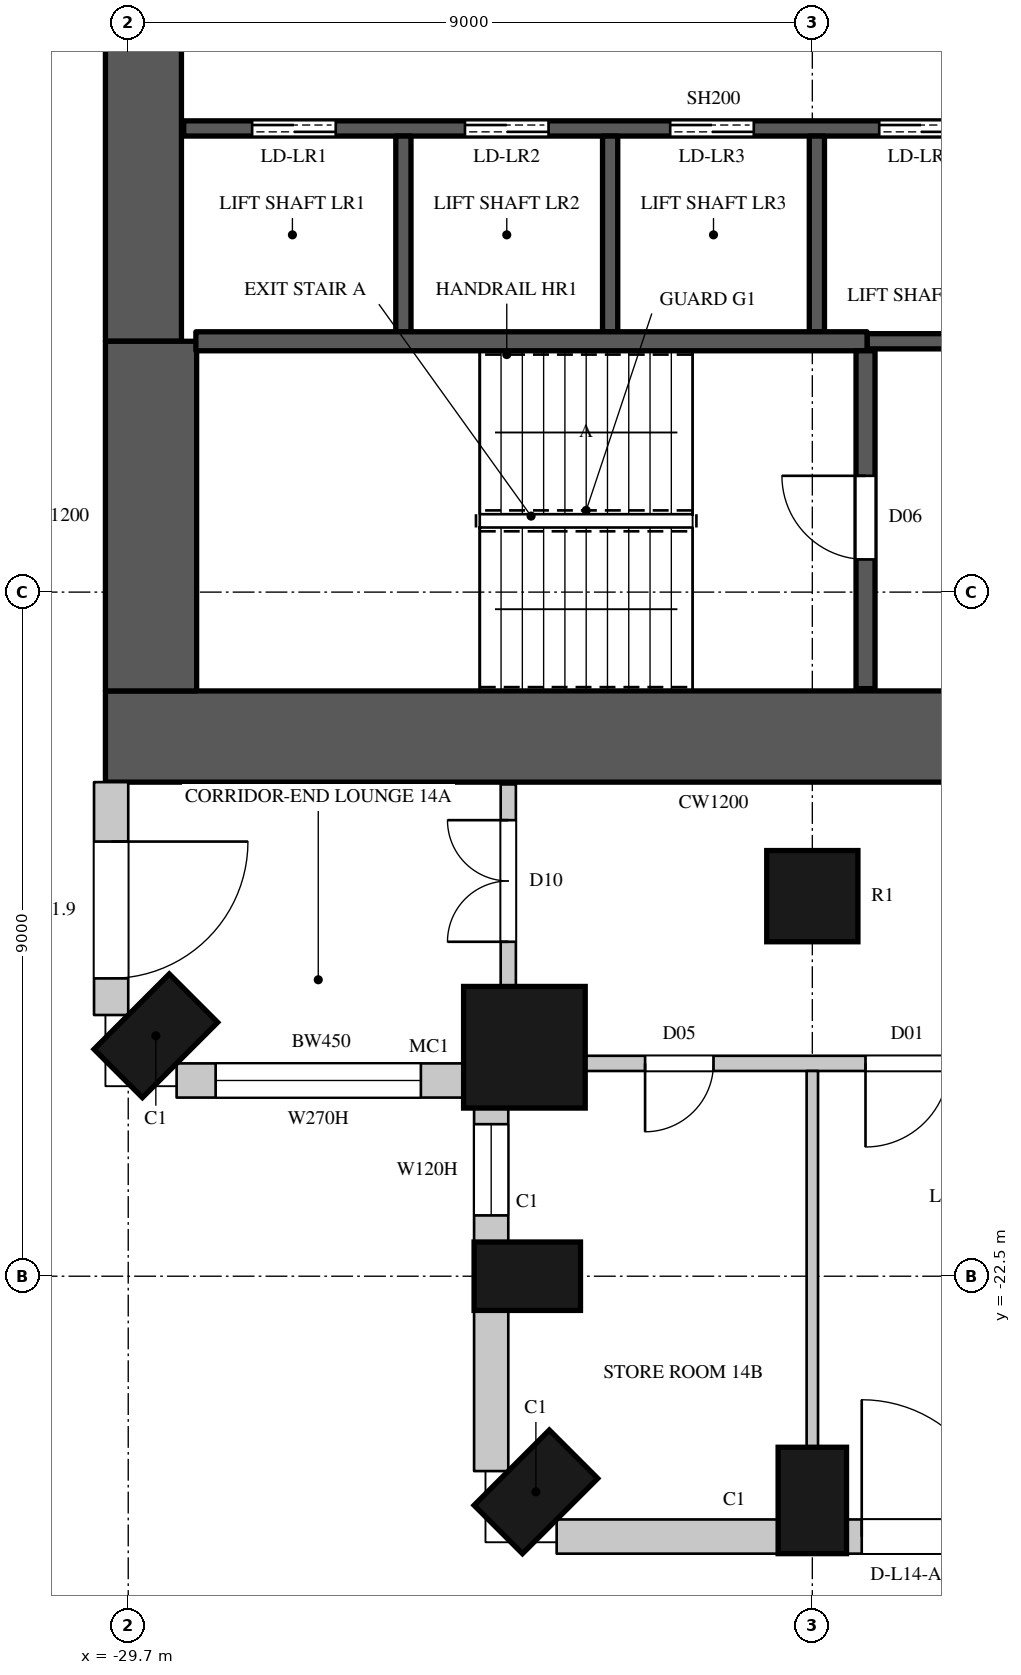
"""IFC4 building model, lengths in metres.
Left out: names, types, materials, properties, quantities, classifications, styles, units other than length and angle.
Written with IfcOpenShell. Run it as: python <this file> out.ifc"""

import sys

from ifc_helpers import new_model, si_unit, direction, frame, frame_2d, origin, origin_2d, place, context, subcontext, project, spatial, rectangle, circle, extrude, element, fill, save


model = new_model("IFC4")
c1 = context("Model", 3, precision=1e-05, world=origin(), true_north=direction((0.0, 1.0)))
c2 = subcontext(c1, "Body", "Model", "MODEL_VIEW")
j1 = project(units=[si_unit("LENGTHUNIT", "METRE"), si_unit("PLANEANGLEUNIT", "RADIAN")], contexts=[c1])
p1 = place(None, origin())
s1 = spatial("IfcSite", under=j1, at=p1, CompositionType="ELEMENT")
p2 = place(p1, origin())
s2 = spatial("IfcBuilding", under=s1, at=p2, CompositionType="ELEMENT")
p3 = place(p2, frame((0.0, 0.0, 80.7)))
s3 = spatial("IfcBuildingStorey", under=s2, at=p3, CompositionType="ELEMENT", Elevation=80.7)
p4 = place(p3, frame((-29.337, -19.337, 0.0), z_axis=(0.0, 0.0, 1.0), x_axis=(0.707106781187, -0.707106781187, 0.0)))
e1 = element("IfcColumn", 1, at=p4, inside=s3, PredefinedType="COLUMN", context=c2, shape_type="SweptSolid", body=[
    extrude(rectangle(XDim=0.9, YDim=1.4, at=origin_2d()), origin(), (0.0, 0.0, 1.0), 3.6),
])
p5 = place(p3, frame((-24.488, -19.488, 0.0), z_axis=(0.0, 0.0, 1.0), x_axis=(1.0, 0.0, 0.0)))
e2 = element("IfcColumn", 2, at=p5, inside=s3, PredefinedType="COLUMN", context=c2, shape_type="SweptSolid", body=[
    extrude(circle(Radius=0.8, at=origin_2d()), origin(), (0.0, 0.0, 1.0), 3.6),
])
for number, where, z_axis, x_axis in (
    (3, (-24.45, -22.5, 0.0), (0.0, 0.0, 1.0), (0.0, -1.0, 0.0)),
    (4, (-24.337, -25.337, 0.0), (0.0, 0.0, 1.0), (0.707, -0.707, 0.0)),
    (5, (-20.7, -25.45, 0.0), (0.0, 0.0, 1.0), (1.0, 0.0, 0.0)),
):
    element("IfcColumn", number, at=place(p3, frame(where, z_axis=z_axis, x_axis=x_axis)), inside=s3, PredefinedType="COLUMN", context=c2, shape_type="SweptSolid", body=[
        extrude(rectangle(XDim=0.9, YDim=1.4, at=origin_2d()), origin(), (0.0, 0.0, 1.0), 3.6),
    ])
p6 = place(p3, frame((-20.7, -17.5, 0.0), z_axis=(0.0, 0.0, 1.0), x_axis=(1.0, 0.0, 0.0)))
e6 = element("IfcColumn", 6, at=p6, inside=s3, PredefinedType="COLUMN", context=c2, shape_type="SweptSolid", body=[
    extrude(circle(Radius=0.6, at=origin_2d()), origin(), (0.0, 0.0, 1.0), 3.6),
])
p7 = place(p3, frame((-29.925, -16.0, 0.0), z_axis=(0.0, 0.0, 1.0), x_axis=(0.0, -1.0, 0.0)))
e7 = element("IfcWall", 7, at=p7, inside=s3, PredefinedType="SOLIDWALL", context=c2, shape_type="SweptSolid", body=[
    extrude(rectangle(XDim=3.064, YDim=0.45, at=frame_2d((1.532, 0.0))), origin(), (0.0, 0.0, 1.0), 3.3),
])
p8 = place(p7, frame((0.782, 0.0, 0.0)))
e8 = element("IfcOpeningElement", 8, at=p8, cuts=e7, PredefinedType="OPENING", context=c2, shape_type="SweptSolid", body=[
    extrude(rectangle(XDim=1.8, YDim=2.4, at=frame_2d((0.9, 1.2))), frame((0.0, 0.235, 0.0), z_axis=(0.0, -1.0, 0.0), x_axis=(1.0, 0.0, 0.0)), (0.0, 0.0, 1.0), 0.47),
])
p9 = place(p3, frame((-29.064, -19.925, 0.0), z_axis=(0.0, 0.0, 1.0), x_axis=(1.0, 0.0, 0.0)))
e9 = element("IfcWall", 9, at=p9, inside=s3, PredefinedType="SOLIDWALL", context=c2, shape_type="SweptSolid", body=[
    extrude(rectangle(XDim=3.805, YDim=0.45, at=frame_2d((1.903, 0.0))), origin(), (0.0, 0.0, 1.0), 3.3),
])
p10 = place(p9, frame((0.514, 0.0, 1.05)))
e10 = element("IfcOpeningElement", 10, at=p10, cuts=e9, PredefinedType="OPENING", context=c2, shape_type="SweptSolid", body=[
    extrude(rectangle(XDim=2.7, YDim=2.0, at=frame_2d((1.35, 1.0))), frame((0.0, 0.235, 0.0), z_axis=(0.0, -1.0, 0.0), x_axis=(1.0, 0.0, 0.0)), (0.0, 0.0, 1.0), 0.47),
])
p11 = place(p3, frame((-24.925, -20.259, 0.0), z_axis=(0.0, 0.0, 1.0), x_axis=(0.0, -1.0, 0.0)))
e11 = element("IfcWall", 11, at=p11, inside=s3, PredefinedType="SOLIDWALL", context=c2, shape_type="SweptSolid", body=[
    extrude(rectangle(XDim=1.792, YDim=0.45, at=frame_2d((0.896, 0.0))), origin(), (0.0, 0.0, 1.0), 3.3),
])
p12 = place(p11, frame((0.241, 0.0, 1.05)))
e12 = element("IfcOpeningElement", 12, at=p12, cuts=e11, PredefinedType="OPENING", context=c2, shape_type="SweptSolid", body=[
    extrude(rectangle(XDim=1.2, YDim=2.0, at=frame_2d((0.6, 1.0))), frame((0.0, 0.235, 0.0), z_axis=(0.0, -1.0, 0.0), x_axis=(1.0, 0.0, 0.0)), (0.0, 0.0, 1.0), 0.47),
])
p13 = place(p3, frame((-24.925, -22.95, 0.0), z_axis=(0.0, 0.0, 1.0), x_axis=(0.0, -1.0, 0.0)))
e13 = element("IfcWall", 13, at=p13, inside=s3, PredefinedType="SOLIDWALL", context=c2, shape_type="SweptSolid", body=[
    extrude(rectangle(XDim=2.114, YDim=0.45, at=frame_2d((1.057, 0.0))), origin(), (0.0, 0.0, 1.0), 3.3),
])
p14 = place(p3, frame((-24.064, -25.925, 0.0), z_axis=(0.0, 0.0, 1.0), x_axis=(1.0, 0.0, 0.0)))
e14 = element("IfcWall", 14, at=p14, inside=s3, PredefinedType="SOLIDWALL", context=c2, shape_type="SweptSolid", body=[
    extrude(rectangle(XDim=2.914, YDim=0.45, at=frame_2d((1.457, 0.0))), origin(), (0.0, 0.0, 1.0), 3.3),
])
p15 = place(p3, frame((-20.25, -25.925, 0.0), z_axis=(0.0, 0.0, 1.0), x_axis=(1.0, 0.0, 0.0)))
e15 = element("IfcWall", 15, at=p15, inside=s3, PredefinedType="SOLIDWALL", context=c2, shape_type="SweptSolid", body=[
    extrude(rectangle(XDim=8.1, YDim=0.45, at=frame_2d((4.05, 0.0))), origin(), (0.0, 0.0, 1.0), 3.3),
])
p16 = place(p15, frame((0.2, 0.0, 0.0)))
e16 = element("IfcOpeningElement", 16, at=p16, cuts=e15, PredefinedType="OPENING", context=c2, shape_type="SweptSolid", body=[
    extrude(rectangle(XDim=1.8, YDim=2.4, at=frame_2d((0.9, 1.2))), frame((0.0, 0.235, 0.0), z_axis=(0.0, -1.0, 0.0), x_axis=(1.0, 0.0, 0.0)), (0.0, 0.0, 1.0), 0.47),
])
p17 = place(p15, frame((2.2, 0.0, 1.05)))
e17 = element("IfcOpeningElement", 17, at=p17, cuts=e15, PredefinedType="OPENING", context=c2, shape_type="SweptSolid", body=[
    extrude(rectangle(XDim=1.2, YDim=2.0, at=frame_2d((0.6, 1.0))), frame((0.0, 0.235, 0.0), z_axis=(0.0, -1.0, 0.0), x_axis=(1.0, 0.0, 0.0)), (0.0, 0.0, 1.0), 0.47),
])
p18 = place(p15, frame((4.7, 0.0, 0.0)))
e18 = element("IfcOpeningElement", 18, at=p18, cuts=e15, PredefinedType="OPENING", context=c2, shape_type="SweptSolid", body=[
    extrude(rectangle(XDim=1.8, YDim=2.4, at=frame_2d((0.9, 1.2))), frame((0.0, 0.235, 0.0), z_axis=(0.0, -1.0, 0.0), x_axis=(1.0, 0.0, 0.0)), (0.0, 0.0, 1.0), 0.47),
])
p19 = place(p15, frame((6.7, 0.0, 1.05)))
e19 = element("IfcOpeningElement", 19, at=p19, cuts=e15, PredefinedType="OPENING", context=c2, shape_type="SweptSolid", body=[
    extrude(rectangle(XDim=1.2, YDim=2.0, at=frame_2d((0.6, 1.0))), frame((0.0, 0.235, 0.0), z_axis=(0.0, -1.0, 0.0), x_axis=(1.0, 0.0, 0.0)), (0.0, 0.0, 1.0), 0.47),
])
p20 = place(p3, frame((-30.0, -15.4, 0.0), z_axis=(0.0, 0.0, 1.0), x_axis=(1.0, 0.0, 0.0)))
e20 = element("IfcWall", 20, at=p20, inside=s3, PredefinedType="SHEAR", context=c2, shape_type="SweptSolid", body=[
    extrude(rectangle(XDim=16.0, YDim=1.2, at=frame_2d((8.0, 0.0))), origin(), (0.0, 0.0, 1.0), 3.6),
])
p21 = place(p20, frame((13.4, 0.0, 0.0)))
e21 = element("IfcOpeningElement", 21, at=p21, cuts=e20, PredefinedType="OPENING", context=c2, shape_type="SweptSolid", body=[
    extrude(rectangle(XDim=1.5, YDim=2.4, at=frame_2d((0.75, 1.2))), frame((0.0, 0.61, 0.0), z_axis=(0.0, -1.0, 0.0), x_axis=(1.0, 0.0, 0.0)), (0.0, 0.0, 1.0), 1.22),
])
p22 = place(p3, frame((-29.5, -10.2, 0.0), z_axis=(0.0, 0.0, 1.0), x_axis=(0.0, 1.0, 0.0)))
e22 = element("IfcWall", 22, at=p22, inside=s3, PredefinedType="SHEAR", context=c2, shape_type="SweptSolid", body=[
    extrude(rectangle(XDim=20.4, YDim=1.0, at=frame_2d((10.2, 0.0))), origin(), (0.0, 0.0, 1.0), 3.6),
])
p23 = place(p3, frame((-29.4, -14.8, 0.0), z_axis=(0.0, 0.0, 1.0), x_axis=(0.0, 1.0, 0.0)))
e23 = element("IfcWall", 23, at=p23, inside=s3, PredefinedType="SHEAR", context=c2, shape_type="SweptSolid", body=[
    extrude(rectangle(XDim=4.6, YDim=1.2, at=frame_2d((2.3, 0.0))), origin(), (0.0, 0.0, 1.0), 3.6),
])
p24 = place(p3, frame((-24.7, -18.7, 0.0), z_axis=(0.0, 0.0, 1.0), x_axis=(0.0, 1.0, 0.0)))
e24 = element("IfcWall", 24, at=p24, inside=s3, PredefinedType="PARTITIONING", context=c2, shape_type="SweptSolid", body=[
    extrude(rectangle(XDim=2.67, YDim=0.2, at=frame_2d((1.335, 0.0))), origin(), (0.0, 0.0, 1.0), 3.3),
])
p25 = place(p24, frame((0.6, 0.0, 0.0)))
e25 = element("IfcOpeningElement", 25, at=p25, cuts=e24, PredefinedType="OPENING", context=c2, shape_type="SweptSolid", body=[
    extrude(rectangle(XDim=1.6, YDim=2.4, at=frame_2d((0.8, 1.2))), frame((0.0, 0.11, 0.0), z_axis=(0.0, -1.0, 0.0), x_axis=(1.0, 0.0, 0.0)), (0.0, 0.0, 1.0), 0.22),
])
p26 = place(p3, frame((-23.7, -19.7, 0.0), z_axis=(0.0, 0.0, 1.0), x_axis=(1.0, 0.0, 0.0)))
e26 = element("IfcWall", 26, at=p26, inside=s3, PredefinedType="PARTITIONING", context=c2, shape_type="SweptSolid", body=[
    extrude(rectangle(XDim=5.1, YDim=0.2, at=frame_2d((2.55, 0.0))), origin(), (0.0, 0.0, 1.0), 3.3),
])
p27 = place(p26, frame((0.8, 0.0, 0.0)))
e27 = element("IfcOpeningElement", 27, at=p27, cuts=e26, PredefinedType="OPENING", context=c2, shape_type="SweptSolid", body=[
    extrude(rectangle(XDim=0.9, YDim=2.2, at=frame_2d((0.45, 1.1))), frame((0.0, 0.11, 0.0), z_axis=(0.0, -1.0, 0.0), x_axis=(1.0, 0.0, 0.0)), (0.0, 0.0, 1.0), 0.22),
])
p28 = place(p26, frame((3.7, 0.0, 0.0)))
e28 = element("IfcOpeningElement", 28, at=p28, cuts=e26, PredefinedType="OPENING", context=c2, shape_type="SweptSolid", body=[
    extrude(rectangle(XDim=1.1, YDim=2.4, at=frame_2d((0.55, 1.2))), frame((0.0, 0.11, 0.0), z_axis=(0.0, -1.0, 0.0), x_axis=(1.0, 0.0, 0.0)), (0.0, 0.0, 1.0), 0.22),
])
p29 = place(p3, frame((-20.7, -24.75, 0.0), z_axis=(0.0, 0.0, 1.0), x_axis=(0.0, 1.0, 0.0)))
e29 = element("IfcWall", 29, at=p29, inside=s3, PredefinedType="PARTITIONING", context=c2, shape_type="SweptSolid", body=[
    extrude(rectangle(XDim=4.95, YDim=0.15, at=frame_2d((2.475, 0.0))), origin(), (0.0, 0.0, 1.0), 2.75),
])
p30 = place(p3, frame((-28.97, -7.4, 0.0), z_axis=(0.0, 0.0, 1.0), x_axis=(1.0, 0.0, 0.0)))
e30 = element("IfcWall", 30, at=p30, inside=s3, PredefinedType="SHEAR", context=c2, shape_type="SweptSolid", body=[
    extrude(rectangle(XDim=13.94, YDim=0.2, at=frame_2d((6.97, 0.0))), origin(), (0.0, 0.0, 1.0), 3.3),
])
p31 = place(p30, frame((0.9, 0.0, 0.0)))
e31 = element("IfcOpeningElement", 31, at=p31, cuts=e30, PredefinedType="OPENING", context=c2, shape_type="SweptSolid", body=[
    extrude(rectangle(XDim=1.1, YDim=2.2, at=frame_2d((0.55, 1.1))), frame((0.0, 0.11, 0.0), z_axis=(0.0, -1.0, 0.0), x_axis=(1.0, 0.0, 0.0)), (0.0, 0.0, 1.0), 0.22),
])
p32 = place(p30, frame((3.7, 0.0, 0.0)))
e32 = element("IfcOpeningElement", 32, at=p32, cuts=e30, PredefinedType="OPENING", context=c2, shape_type="SweptSolid", body=[
    extrude(rectangle(XDim=1.1, YDim=2.2, at=frame_2d((0.55, 1.1))), frame((0.0, 0.11, 0.0), z_axis=(0.0, -1.0, 0.0), x_axis=(1.0, 0.0, 0.0)), (0.0, 0.0, 1.0), 0.22),
])
p33 = place(p30, frame((6.4, 0.0, 0.0)))
e33 = element("IfcOpeningElement", 33, at=p33, cuts=e30, PredefinedType="OPENING", context=c2, shape_type="SweptSolid", body=[
    extrude(rectangle(XDim=1.1, YDim=2.2, at=frame_2d((0.55, 1.1))), frame((0.0, 0.11, 0.0), z_axis=(0.0, -1.0, 0.0), x_axis=(1.0, 0.0, 0.0)), (0.0, 0.0, 1.0), 0.22),
])
p34 = place(p30, frame((9.15, 0.0, 0.0)))
e34 = element("IfcOpeningElement", 34, at=p34, cuts=e30, PredefinedType="OPENING", context=c2, shape_type="SweptSolid", body=[
    extrude(rectangle(XDim=1.1, YDim=2.2, at=frame_2d((0.55, 1.1))), frame((0.0, 0.11, 0.0), z_axis=(0.0, -1.0, 0.0), x_axis=(1.0, 0.0, 0.0)), (0.0, 0.0, 1.0), 0.22),
])
for number, where, z_axis, x_axis in (
    (35, (-26.08, -10.075, 0.0), (0.0, 0.0, 1.0), (0.0, 1.0, 0.0)),
    (36, (-23.36, -10.075, 0.0), (0.0, 0.0, 1.0), (0.0, 1.0, 0.0)),
    (37, (-20.64, -10.075, 0.0), (0.0, 0.0, 1.0), (0.0, 1.0, 0.0)),
):
    element("IfcWall", number, at=place(p3, frame(where, z_axis=z_axis, x_axis=x_axis)), inside=s3, PredefinedType="SHEAR", context=c2, shape_type="SweptSolid", body=[
        extrude(rectangle(XDim=2.575, YDim=0.2, at=frame_2d((1.288, 0.0))), origin(), (0.0, 0.0, 1.0), 3.6),
    ])
p35 = place(p3, frame((-19.98, -10.2, 0.0), z_axis=(0.0, 0.0, 1.0), x_axis=(1.0, 0.0, 0.0)))
e38 = element("IfcWall", 38, at=p35, inside=s3, PredefinedType="SHEAR", context=c2, shape_type="SweptSolid", body=[
    extrude(rectangle(XDim=4.95, YDim=0.2, at=frame_2d((2.475, 0.0))), origin(), (0.0, 0.0, 1.0), 3.3),
])
p36 = place(p35, frame((2.95, 0.0, 0.0)))
e39 = element("IfcOpeningElement", 39, at=p36, cuts=e38, PredefinedType="OPENING", context=c2, shape_type="SweptSolid", body=[
    extrude(rectangle(XDim=1.1, YDim=2.2, at=frame_2d((0.55, 1.1))), frame((0.0, 0.11, 0.0), z_axis=(0.0, -1.0, 0.0), x_axis=(1.0, 0.0, 0.0)), (0.0, 0.0, 1.0), 0.22),
])
p37 = place(p3, frame((-28.81, -10.2, 0.0), z_axis=(0.0, 0.0, 1.0), x_axis=(1.0, 0.0, 0.0)))
e40 = element("IfcWall", 40, at=p37, inside=s3, PredefinedType="SHEAR", context=c2, shape_type="SweptSolid", body=[
    extrude(rectangle(XDim=8.83, YDim=0.25, at=frame_2d((4.415, 0.0))), origin(), (0.0, 0.0, 1.0), 3.3),
])
p38 = place(p3, frame((-20.0, -14.77, 0.0), z_axis=(0.0, 0.0, 1.0), x_axis=(0.0, 1.0, 0.0)))
e41 = element("IfcWall", 41, at=p38, inside=s3, PredefinedType="SHEAR", context=c2, shape_type="SweptSolid", body=[
    extrude(rectangle(XDim=4.445, YDim=0.25, at=frame_2d((2.223, 0.0))), origin(), (0.0, 0.0, 1.0), 3.3),
])
p39 = place(p38, frame((1.7, 0.0, 0.0)))
e42 = element("IfcOpeningElement", 42, at=p39, cuts=e41, PredefinedType="OPENING", context=c2, shape_type="SweptSolid", body=[
    extrude(rectangle(XDim=1.1, YDim=2.2, at=frame_2d((0.55, 1.1))), frame((0.0, 0.135, 0.0), z_axis=(0.0, -1.0, 0.0), x_axis=(1.0, 0.0, 0.0)), (0.0, 0.0, 1.0), 0.27),
])
p40 = place(p8, origin())
e43 = element("IfcDoor", 43, at=p40, inside=s3, OperationType="SLIDING_TO_LEFT", PredefinedType="DOOR", context=c2, shape_type="SweptSolid", body=[
    extrude(rectangle(XDim=1.8, YDim=2.4, at=frame_2d((0.9, 1.2))), frame((0.0, 0.13, 0.0), z_axis=(0.0, -1.0, 0.0), x_axis=(1.0, 0.0, 0.0)), (0.0, 0.0, 1.0), 0.05),
])
fill(e8, e43)
p41 = place(p10, origin())
e44 = element("IfcWindow", 44, at=p41, inside=s3, PartitioningType="SINGLE_PANEL", PredefinedType="WINDOW", context=c2, shape_type="SweptSolid", body=[
    extrude(rectangle(XDim=2.7, YDim=2.0, at=frame_2d((1.35, 1.0))), frame((0.0, 0.135, 0.0), z_axis=(0.0, -1.0, 0.0), x_axis=(1.0, 0.0, 0.0)), (0.0, 0.0, 1.0), 0.06),
])
fill(e10, e44)
p42 = place(p12, origin())
e45 = element("IfcWindow", 45, at=p42, inside=s3, PartitioningType="SINGLE_PANEL", PredefinedType="WINDOW", context=c2, shape_type="SweptSolid", body=[
    extrude(rectangle(XDim=1.2, YDim=2.0, at=frame_2d((0.6, 1.0))), frame((0.0, 0.135, 0.0), z_axis=(0.0, -1.0, 0.0), x_axis=(1.0, 0.0, 0.0)), (0.0, 0.0, 1.0), 0.06),
])
fill(e12, e45)
p43 = place(p16, origin())
e46 = element("IfcDoor", 46, at=p43, inside=s3, OperationType="SLIDING_TO_LEFT", PredefinedType="DOOR", context=c2, shape_type="SweptSolid", body=[
    extrude(rectangle(XDim=1.8, YDim=2.4, at=frame_2d((0.9, 1.2))), frame((0.0, 0.13, 0.0), z_axis=(0.0, -1.0, 0.0), x_axis=(1.0, 0.0, 0.0)), (0.0, 0.0, 1.0), 0.05),
])
fill(e16, e46)
p44 = place(p39, origin())
e47 = element("IfcDoor", 47, at=p44, inside=s3, OperationType="SINGLE_SWING_RIGHT", PredefinedType="DOOR", context=c2, shape_type="SweptSolid", body=[
    extrude(rectangle(XDim=1.1, YDim=2.2, at=frame_2d((0.55, 1.1))), frame((0.0, 0.025, 0.0), z_axis=(0.0, -1.0, 0.0), x_axis=(1.0, 0.0, 0.0)), (0.0, 0.0, 1.0), 0.05),
])
fill(e42, e47)
p45 = place(p31, origin())
e48 = element("IfcDoor", 48, at=p45, inside=s3, OperationType="DOUBLE_DOOR_SLIDING", PredefinedType="DOOR", context=c2, shape_type="SweptSolid", body=[
    extrude(rectangle(XDim=1.1, YDim=2.2, at=frame_2d((0.55, 1.1))), frame((0.0, 0.025, 0.0), z_axis=(0.0, -1.0, 0.0), x_axis=(1.0, 0.0, 0.0)), (0.0, 0.0, 1.0), 0.05),
])
fill(e31, e48)
p46 = place(p32, origin())
e49 = element("IfcDoor", 49, at=p46, inside=s3, OperationType="DOUBLE_DOOR_SLIDING", PredefinedType="DOOR", context=c2, shape_type="SweptSolid", body=[
    extrude(rectangle(XDim=1.1, YDim=2.2, at=frame_2d((0.55, 1.1))), frame((0.0, 0.025, 0.0), z_axis=(0.0, -1.0, 0.0), x_axis=(1.0, 0.0, 0.0)), (0.0, 0.0, 1.0), 0.05),
])
fill(e32, e49)
p47 = place(p33, origin())
e50 = element("IfcDoor", 50, at=p47, inside=s3, OperationType="DOUBLE_DOOR_SLIDING", PredefinedType="DOOR", context=c2, shape_type="SweptSolid", body=[
    extrude(rectangle(XDim=1.1, YDim=2.2, at=frame_2d((0.55, 1.1))), frame((0.0, 0.025, 0.0), z_axis=(0.0, -1.0, 0.0), x_axis=(1.0, 0.0, 0.0)), (0.0, 0.0, 1.0), 0.05),
])
fill(e33, e50)
p48 = place(p34, origin())
e51 = element("IfcDoor", 51, at=p48, inside=s3, OperationType="DOUBLE_DOOR_SLIDING", PredefinedType="DOOR", context=c2, shape_type="SweptSolid", body=[
    extrude(rectangle(XDim=1.1, YDim=2.2, at=frame_2d((0.55, 1.1))), frame((0.0, 0.025, 0.0), z_axis=(0.0, -1.0, 0.0), x_axis=(1.0, 0.0, 0.0)), (0.0, 0.0, 1.0), 0.05),
])
fill(e34, e51)
p49 = place(p27, origin())
e52 = element("IfcDoor", 52, at=p49, inside=s3, OperationType="SINGLE_SWING_RIGHT", PredefinedType="DOOR", context=c2, shape_type="SweptSolid", body=[
    extrude(rectangle(XDim=0.9, YDim=2.2, at=frame_2d((0.45, 1.1))), frame((0.0, 0.025, 0.0), z_axis=(0.0, -1.0, 0.0), x_axis=(1.0, 0.0, 0.0)), (0.0, 0.0, 1.0), 0.05),
])
fill(e27, e52)
p50 = place(p25, origin())
e53 = element("IfcDoor", 53, at=p50, inside=s3, OperationType="DOUBLE_DOOR_SINGLE_SWING", PredefinedType="DOOR", context=c2, shape_type="SweptSolid", body=[
    extrude(rectangle(XDim=1.6, YDim=2.4, at=frame_2d((0.8, 1.2))), frame((0.0, 0.025, 0.0), z_axis=(0.0, -1.0, 0.0), x_axis=(1.0, 0.0, 0.0)), (0.0, 0.0, 1.0), 0.05),
])
fill(e25, e53)
p51 = place(p28, origin())
e54 = element("IfcDoor", 54, at=p51, inside=s3, OperationType="SINGLE_SWING_RIGHT", PredefinedType="DOOR", context=c2, shape_type="SweptSolid", body=[
    extrude(rectangle(XDim=1.1, YDim=2.4, at=frame_2d((0.55, 1.2))), frame((0.0, 0.025, 0.0), z_axis=(0.0, -1.0, 0.0), x_axis=(1.0, 0.0, 0.0)), (0.0, 0.0, 1.0), 0.05),
])
fill(e28, e54)
save(model, sys.argv[1])
